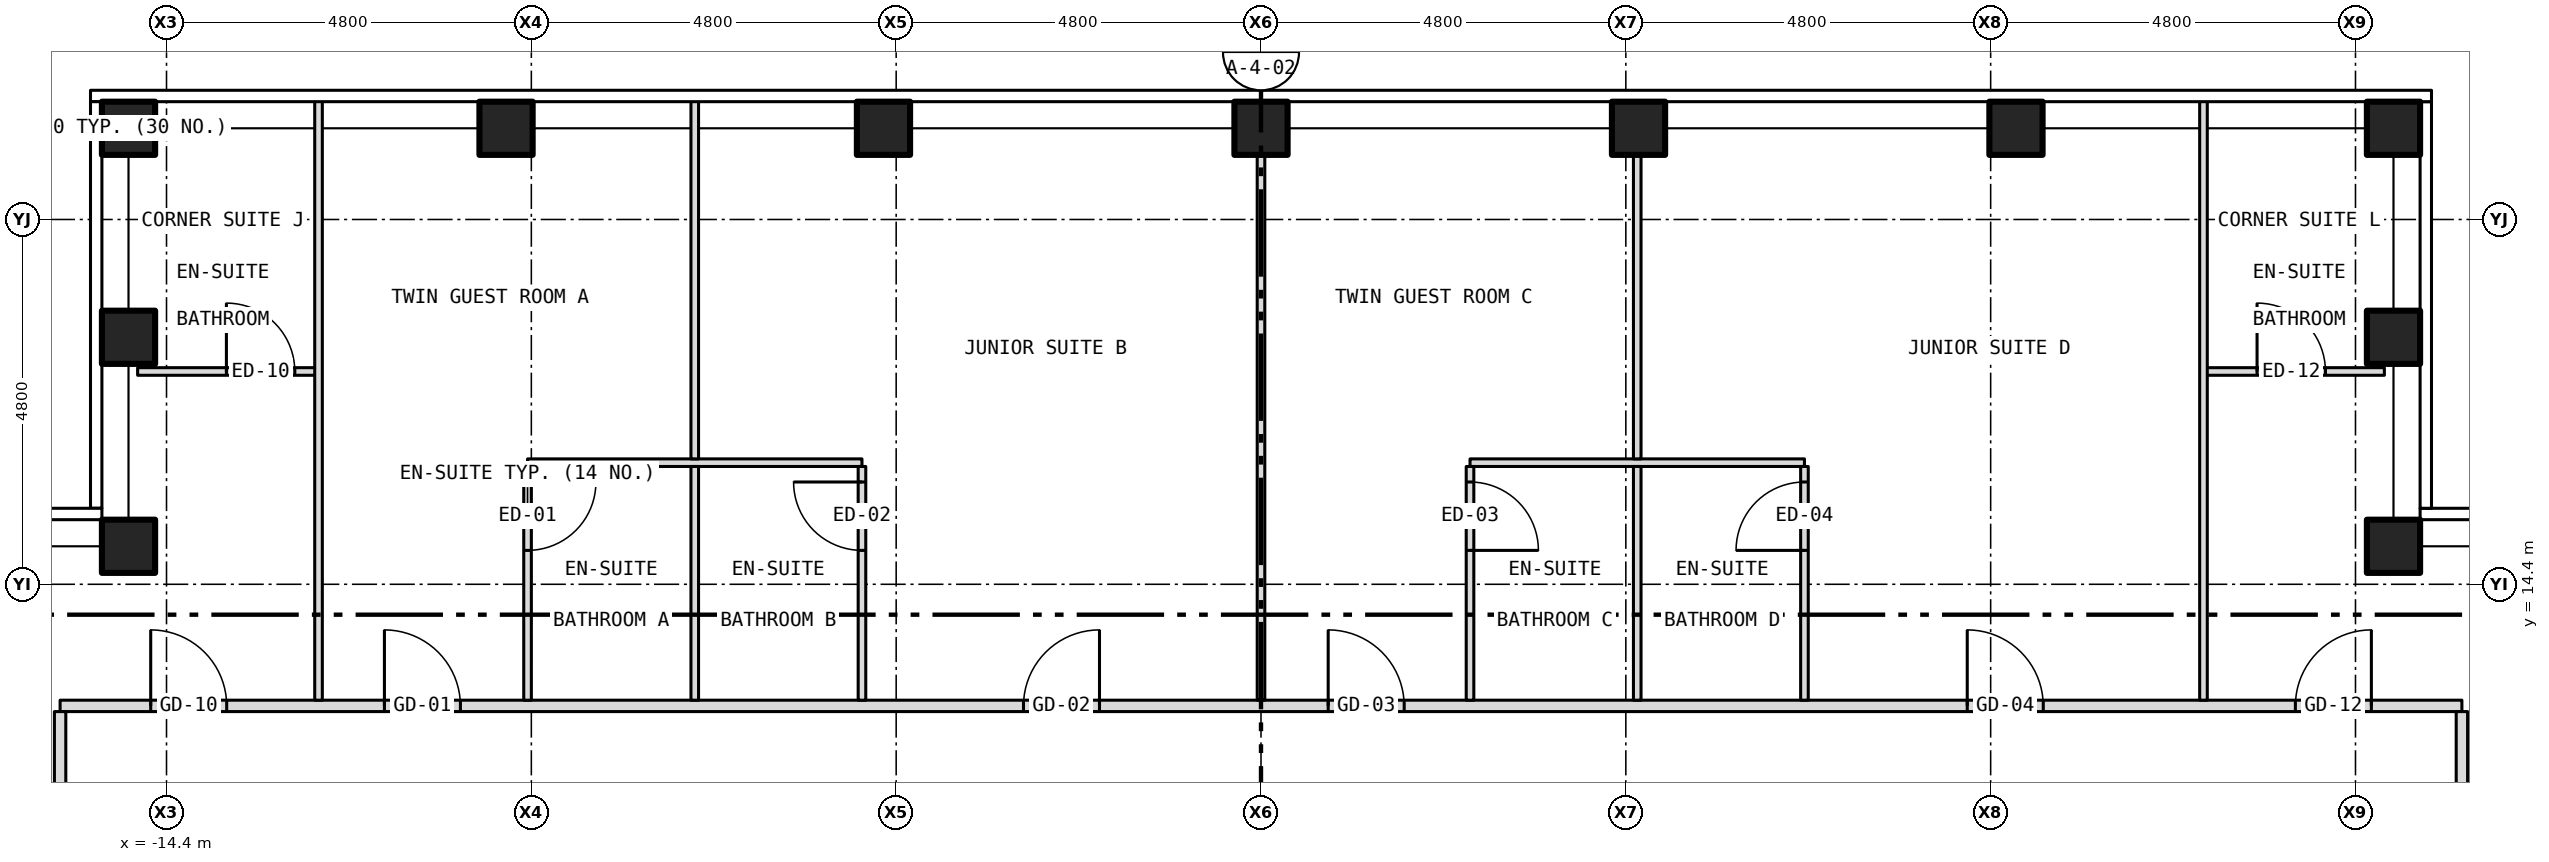
"""IFC4 building model, lengths in metres.
Left out: names, types, materials, properties, quantities, classifications, styles, units other than length and angle.
Written with IfcOpenShell. Run it as: python <this file> out.ifc"""

import sys

from ifc_helpers import new_model, si_unit, direction, frame, frame_2d, origin, origin_2d, place, context, subcontext, project, spatial, rectangle, hollow_rectangle, extrude, element, fill, save


model = new_model("IFC4")
c1 = context("Model", 3, precision=1e-05, world=origin(), true_north=direction((0.0, 1.0)))
c2 = subcontext(c1, "Body", "Model", "MODEL_VIEW")
j1 = project(units=[si_unit("LENGTHUNIT", "METRE"), si_unit("PLANEANGLEUNIT", "RADIAN")], contexts=[c1])
p1 = place(None, origin())
s1 = spatial("IfcSite", under=j1, at=p1, CompositionType="ELEMENT")
p2 = place(p1, origin())
s2 = spatial("IfcBuilding", under=s1, at=p2, CompositionType="ELEMENT")
p3 = place(p2, frame((0.0, 0.0, 201.5)))
s3 = spatial("IfcBuildingStorey", under=s2, at=p3, CompositionType="ELEMENT", Elevation=201.5)
for number, where, z_axis, x_axis in (
    (1, (-14.9, 20.4, -0.15), (0.0, 0.0, 1.0), (1.0, 0.0, 0.0)),
    (2, (-9.933, 20.4, -0.15), (0.0, 0.0, 1.0), (1.0, 0.0, 0.0)),
    (3, (-4.967, 20.4, -0.15), (0.0, 0.0, 1.0), (1.0, 0.0, 0.0)),
    (4, (0.0, 20.4, -0.15), (0.0, 0.0, 1.0), (1.0, 0.0, 0.0)),
    (5, (4.967, 20.4, -0.15), (0.0, 0.0, 1.0), (1.0, 0.0, 0.0)),
    (6, (9.933, 20.4, -0.15), (0.0, 0.0, 1.0), (1.0, 0.0, 0.0)),
    (7, (14.9, 20.4, -0.15), (0.0, 0.0, 1.0), (1.0, 0.0, 0.0)),
    (8, (-14.9, 14.9, -0.15), (0.0, 0.0, 1.0), (1.0, 0.0, 0.0)),
    (9, (-14.9, 17.65, -0.15), (0.0, 0.0, 1.0), (1.0, 0.0, 0.0)),
    (10, (14.9, 14.9, -0.15), (0.0, 0.0, 1.0), (1.0, 0.0, 0.0)),
    (11, (14.9, 17.65, -0.15), (0.0, 0.0, 1.0), (1.0, 0.0, 0.0)),
):
    element("IfcColumn", number, at=place(p3, frame(where, z_axis=z_axis, x_axis=x_axis)), inside=s3, PredefinedType="COLUMN", context=c2, shape_type="SweptSolid", body=[
        extrude(hollow_rectangle(XDim=0.7, YDim=0.7, WallThickness=0.04, at=origin_2d()), origin(), (0.0, 0.0, 1.0), 3.5),
    ])
p4 = place(p3, frame((-15.8, 12.8, 0.0), z_axis=(0.0, 0.0, 1.0), x_axis=(1.0, 0.0, 0.0)))
e12 = element("IfcWall", 12, at=p4, inside=s3, PredefinedType="PARTITIONING", context=c2, shape_type="SweptSolid", body=[
    extrude(rectangle(XDim=31.6, YDim=0.15, at=frame_2d((15.8, 0.0))), origin(), (0.0, 0.0, 1.0), 3.35),
])
p5 = place(p4, frame((4.267, 0.0, 0.0)))
e13 = element("IfcOpeningElement", 13, at=p5, cuts=e12, PredefinedType="OPENING", context=c2, shape_type="SweptSolid", body=[
    extrude(rectangle(XDim=1.0, YDim=2.1, at=frame_2d((0.5, 1.05))), frame((0.0, 0.087, 0.0), z_axis=(0.0, -1.0, 0.0), x_axis=(1.0, 0.0, 0.0)), (0.0, 0.0, 1.0), 0.174),
])
p6 = place(p4, frame((12.675, 0.0, 0.0)))
e14 = element("IfcOpeningElement", 14, at=p6, cuts=e12, PredefinedType="OPENING", context=c2, shape_type="SweptSolid", body=[
    extrude(rectangle(XDim=1.0, YDim=2.1, at=frame_2d((0.5, 1.05))), frame((0.0, 0.087, 0.0), z_axis=(0.0, -1.0, 0.0), x_axis=(1.0, 0.0, 0.0)), (0.0, 0.0, 1.0), 0.174),
])
p7 = place(p4, frame((16.684, 0.0, 0.0)))
e15 = element("IfcOpeningElement", 15, at=p7, cuts=e12, PredefinedType="OPENING", context=c2, shape_type="SweptSolid", body=[
    extrude(rectangle(XDim=1.0, YDim=2.1, at=frame_2d((0.5, 1.05))), frame((0.0, 0.087, 0.0), z_axis=(0.0, -1.0, 0.0), x_axis=(1.0, 0.0, 0.0)), (0.0, 0.0, 1.0), 0.174),
])
p8 = place(p4, frame((25.092, 0.0, 0.0)))
e16 = element("IfcOpeningElement", 16, at=p8, cuts=e12, PredefinedType="OPENING", context=c2, shape_type="SweptSolid", body=[
    extrude(rectangle(XDim=1.0, YDim=2.1, at=frame_2d((0.5, 1.05))), frame((0.0, 0.087, 0.0), z_axis=(0.0, -1.0, 0.0), x_axis=(1.0, 0.0, 0.0)), (0.0, 0.0, 1.0), 0.174),
])
p9 = place(p4, frame((1.192, 0.0, 0.0)))
e17 = element("IfcOpeningElement", 17, at=p9, cuts=e12, PredefinedType="OPENING", context=c2, shape_type="SweptSolid", body=[
    extrude(rectangle(XDim=1.0, YDim=2.1, at=frame_2d((0.5, 1.05))), frame((0.0, 0.087, 0.0), z_axis=(0.0, -1.0, 0.0), x_axis=(1.0, 0.0, 0.0)), (0.0, 0.0, 1.0), 0.174),
])
p10 = place(p4, frame((29.409, 0.0, 0.0)))
e18 = element("IfcOpeningElement", 18, at=p10, cuts=e12, PredefinedType="OPENING", context=c2, shape_type="SweptSolid", body=[
    extrude(rectangle(XDim=1.0, YDim=2.1, at=frame_2d((0.5, 1.05))), frame((0.0, 0.087, 0.0), z_axis=(0.0, -1.0, 0.0), x_axis=(1.0, 0.0, 0.0)), (0.0, 0.0, 1.0), 0.174),
])
for number, where, z_axis, x_axis in (
    (19, (-9.65, 16.0, 0.0), (0.0, 0.0, 1.0), (1.0, 0.0, 0.0)),
    (20, (2.75, 16.0, 0.0), (0.0, 0.0, 1.0), (1.0, 0.0, 0.0)),
):
    element("IfcWall", number, at=place(p3, frame(where, z_axis=z_axis, x_axis=x_axis)), inside=s3, PredefinedType="PARTITIONING", context=c2, shape_type="SweptSolid", body=[
        extrude(rectangle(XDim=4.4, YDim=0.1, at=frame_2d((2.2, 0.0))), origin(), (0.0, 0.0, 1.0), 3.35),
    ])
p11 = place(p3, frame((-14.78, 17.2, 0.0), z_axis=(0.0, 0.0, 1.0), x_axis=(1.0, 0.0, 0.0)))
e21 = element("IfcWall", 21, at=p11, inside=s3, PredefinedType="PARTITIONING", context=c2, shape_type="SweptSolid", body=[
    extrude(rectangle(XDim=2.38, YDim=0.1, at=frame_2d((1.19, 0.0))), origin(), (0.0, 0.0, 1.0), 3.35),
])
p12 = place(p11, frame((1.168, 0.0, 0.0)))
e22 = element("IfcOpeningElement", 22, at=p12, cuts=e21, PredefinedType="OPENING", context=c2, shape_type="SweptSolid", body=[
    extrude(rectangle(XDim=0.9, YDim=2.1, at=frame_2d((0.45, 1.05))), frame((0.0, 0.062, 0.0), z_axis=(0.0, -1.0, 0.0), x_axis=(1.0, 0.0, 0.0)), (0.0, 0.0, 1.0), 0.124),
])
p13 = place(p3, frame((12.4, 17.2, 0.0), z_axis=(0.0, 0.0, 1.0), x_axis=(1.0, 0.0, 0.0)))
e23 = element("IfcWall", 23, at=p13, inside=s3, PredefinedType="PARTITIONING", context=c2, shape_type="SweptSolid", body=[
    extrude(rectangle(XDim=2.38, YDim=0.1, at=frame_2d((1.19, 0.0))), origin(), (0.0, 0.0, 1.0), 3.35),
])
p14 = place(p13, frame((0.705, 0.0, 0.0)))
e24 = element("IfcOpeningElement", 24, at=p14, cuts=e23, PredefinedType="OPENING", context=c2, shape_type="SweptSolid", body=[
    extrude(rectangle(XDim=0.9, YDim=2.1, at=frame_2d((0.45, 1.05))), frame((0.0, 0.062, 0.0), z_axis=(0.0, -1.0, 0.0), x_axis=(1.0, 0.0, 0.0)), (0.0, 0.0, 1.0), 0.124),
])
p15 = place(p3, frame((-15.8, 10.92, 0.0), z_axis=(0.0, 0.0, 1.0), x_axis=(0.0, 1.0, 0.0)))
e25 = element("IfcWall", 25, at=p15, inside=s3, PredefinedType="PARTITIONING", context=c2, shape_type="SweptSolid", body=[
    extrude(rectangle(XDim=1.805, YDim=0.15, at=frame_2d((0.903, 0.0))), origin(), (0.0, 0.0, 1.0), 3.35),
])
p16 = place(p3, frame((-12.4, 12.875, 0.0), z_axis=(0.0, 0.0, 1.0), x_axis=(0.0, 1.0, 0.0)))
e26 = element("IfcWall", 26, at=p16, inside=s3, PredefinedType="PARTITIONING", context=c2, shape_type="SweptSolid", body=[
    extrude(rectangle(XDim=7.905, YDim=0.1, at=frame_2d((3.953, 0.0))), origin(), (0.0, 0.0, 1.0), 3.35),
])
p17 = place(p3, frame((-9.65, 12.875, 0.0), z_axis=(0.0, 0.0, 1.0), x_axis=(0.0, 1.0, 0.0)))
e27 = element("IfcWall", 27, at=p17, inside=s3, PredefinedType="PARTITIONING", context=c2, shape_type="SweptSolid", body=[
    extrude(rectangle(XDim=3.075, YDim=0.1, at=frame_2d((1.538, 0.0))), origin(), (0.0, 0.0, 1.0), 2.728),
])
p18 = place(p17, frame((1.971, 0.0, 0.0)))
e28 = element("IfcOpeningElement", 28, at=p18, cuts=e27, PredefinedType="OPENING", context=c2, shape_type="SweptSolid", body=[
    extrude(rectangle(XDim=0.9, YDim=2.1, at=frame_2d((0.45, 1.05))), frame((0.0, 0.062, 0.0), z_axis=(0.0, -1.0, 0.0), x_axis=(1.0, 0.0, 0.0)), (0.0, 0.0, 1.0), 0.124),
])
p19 = place(p3, frame((-7.45, 12.875, 0.0), z_axis=(0.0, 0.0, 1.0), x_axis=(0.0, 1.0, 0.0)))
e29 = element("IfcWall", 29, at=p19, inside=s3, PredefinedType="PARTITIONING", context=c2, shape_type="SweptSolid", body=[
    extrude(rectangle(XDim=3.075, YDim=0.1, at=frame_2d((1.538, 0.0))), origin(), (0.0, 0.0, 1.0), 3.35),
])
p20 = place(p3, frame((-7.45, 16.05, 0.0), z_axis=(0.0, 0.0, 1.0), x_axis=(0.0, 1.0, 0.0)))
e30 = element("IfcWall", 30, at=p20, inside=s3, PredefinedType="PARTITIONING", context=c2, shape_type="SweptSolid", body=[
    extrude(rectangle(XDim=4.73, YDim=0.1, at=frame_2d((2.365, 0.0))), origin(), (0.0, 0.0, 1.0), 3.35),
])
p21 = place(p3, frame((-5.25, 12.875, 0.0), z_axis=(0.0, 0.0, 1.0), x_axis=(0.0, 1.0, 0.0)))
e31 = element("IfcWall", 31, at=p21, inside=s3, PredefinedType="PARTITIONING", context=c2, shape_type="SweptSolid", body=[
    extrude(rectangle(XDim=3.075, YDim=0.1, at=frame_2d((1.538, 0.0))), origin(), (0.0, 0.0, 1.0), 3.35),
])
p22 = place(p21, frame((1.971, 0.0, 0.0)))
e32 = element("IfcOpeningElement", 32, at=p22, cuts=e31, PredefinedType="OPENING", context=c2, shape_type="SweptSolid", body=[
    extrude(rectangle(XDim=0.9, YDim=2.1, at=frame_2d((0.45, 1.05))), frame((0.0, 0.062, 0.0), z_axis=(0.0, -1.0, 0.0), x_axis=(1.0, 0.0, 0.0)), (0.0, 0.0, 1.0), 0.124),
])
p23 = place(p3, frame((0.0, 12.875, 0.0), z_axis=(0.0, 0.0, 1.0), x_axis=(0.0, 1.0, 0.0)))
e33 = element("IfcWall", 33, at=p23, inside=s3, PredefinedType="PARTITIONING", context=c2, shape_type="SweptSolid", body=[
    extrude(rectangle(XDim=7.405, YDim=0.1, at=frame_2d((3.703, 0.0))), origin(), (0.0, 0.0, 1.0), 2.728),
])
p24 = place(p3, frame((2.75, 12.875, 0.0), z_axis=(0.0, 0.0, 1.0), x_axis=(0.0, 1.0, 0.0)))
e34 = element("IfcWall", 34, at=p24, inside=s3, PredefinedType="PARTITIONING", context=c2, shape_type="SweptSolid", body=[
    extrude(rectangle(XDim=3.075, YDim=0.1, at=frame_2d((1.538, 0.0))), origin(), (0.0, 0.0, 1.0), 3.35),
])
p25 = place(p24, frame((1.971, 0.0, 0.0)))
e35 = element("IfcOpeningElement", 35, at=p25, cuts=e34, PredefinedType="OPENING", context=c2, shape_type="SweptSolid", body=[
    extrude(rectangle(XDim=0.9, YDim=2.1, at=frame_2d((0.45, 1.05))), frame((0.0, 0.062, 0.0), z_axis=(0.0, -1.0, 0.0), x_axis=(1.0, 0.0, 0.0)), (0.0, 0.0, 1.0), 0.124),
])
p26 = place(p3, frame((4.95, 12.875, 0.0), z_axis=(0.0, 0.0, 1.0), x_axis=(0.0, 1.0, 0.0)))
e36 = element("IfcWall", 36, at=p26, inside=s3, PredefinedType="PARTITIONING", context=c2, shape_type="SweptSolid", body=[
    extrude(rectangle(XDim=3.075, YDim=0.1, at=frame_2d((1.538, 0.0))), origin(), (0.0, 0.0, 1.0), 2.817),
])
p27 = place(p3, frame((4.95, 16.05, 0.0), z_axis=(0.0, 0.0, 1.0), x_axis=(0.0, 1.0, 0.0)))
e37 = element("IfcWall", 37, at=p27, inside=s3, PredefinedType="PARTITIONING", context=c2, shape_type="SweptSolid", body=[
    extrude(rectangle(XDim=4.23, YDim=0.1, at=frame_2d((2.115, 0.0))), origin(), (0.0, 0.0, 1.0), 2.817),
])
p28 = place(p3, frame((7.15, 12.875, 0.0), z_axis=(0.0, 0.0, 1.0), x_axis=(0.0, 1.0, 0.0)))
e38 = element("IfcWall", 38, at=p28, inside=s3, PredefinedType="PARTITIONING", context=c2, shape_type="SweptSolid", body=[
    extrude(rectangle(XDim=3.075, YDim=0.1, at=frame_2d((1.538, 0.0))), origin(), (0.0, 0.0, 1.0), 3.35),
])
p29 = place(p28, frame((1.971, 0.0, 0.0)))
e39 = element("IfcOpeningElement", 39, at=p29, cuts=e38, PredefinedType="OPENING", context=c2, shape_type="SweptSolid", body=[
    extrude(rectangle(XDim=0.9, YDim=2.1, at=frame_2d((0.45, 1.05))), frame((0.0, 0.062, 0.0), z_axis=(0.0, -1.0, 0.0), x_axis=(1.0, 0.0, 0.0)), (0.0, 0.0, 1.0), 0.124),
])
p30 = place(p3, frame((12.4, 12.875, 0.0), z_axis=(0.0, 0.0, 1.0), x_axis=(0.0, 1.0, 0.0)))
e40 = element("IfcWall", 40, at=p30, inside=s3, PredefinedType="PARTITIONING", context=c2, shape_type="SweptSolid", body=[
    extrude(rectangle(XDim=7.905, YDim=0.1, at=frame_2d((3.953, 0.0))), origin(), (0.0, 0.0, 1.0), 3.35),
])
p31 = place(p3, frame((15.8, 10.92, 0.0), z_axis=(0.0, 0.0, 1.0), x_axis=(0.0, 1.0, 0.0)))
e41 = element("IfcWall", 41, at=p31, inside=s3, PredefinedType="PARTITIONING", context=c2, shape_type="SweptSolid", body=[
    extrude(rectangle(XDim=1.805, YDim=0.15, at=frame_2d((0.903, 0.0))), origin(), (0.0, 0.0, 1.0), 3.35),
])
p32 = place(p5, origin())
e42 = element("IfcDoor", 42, at=p32, inside=s3, OperationType="SINGLE_SWING_LEFT", PredefinedType="DOOR", context=c2, shape_type="SweptSolid", body=[
    extrude(rectangle(XDim=1.0, YDim=2.1, at=frame_2d((0.5, 1.05))), frame((0.0, 0.025, 0.0), z_axis=(0.0, -1.0, 0.0), x_axis=(1.0, 0.0, 0.0)), (0.0, 0.0, 1.0), 0.05),
])
fill(e13, e42)
p33 = place(p18, origin())
e43 = element("IfcDoor", 43, at=p33, inside=s3, OperationType="SINGLE_SWING_RIGHT", PredefinedType="DOOR", context=c2, shape_type="SweptSolid", body=[
    extrude(rectangle(XDim=0.9, YDim=2.1, at=frame_2d((0.45, 1.05))), frame((0.0, 0.025, 0.0), z_axis=(0.0, -1.0, 0.0), x_axis=(1.0, 0.0, 0.0)), (0.0, 0.0, 1.0), 0.05),
])
fill(e28, e43)
p34 = place(p6, origin())
e44 = element("IfcDoor", 44, at=p34, inside=s3, OperationType="SINGLE_SWING_RIGHT", PredefinedType="DOOR", context=c2, shape_type="SweptSolid", body=[
    extrude(rectangle(XDim=1.0, YDim=2.1, at=frame_2d((0.5, 1.05))), frame((0.0, 0.025, 0.0), z_axis=(0.0, -1.0, 0.0), x_axis=(1.0, 0.0, 0.0)), (0.0, 0.0, 1.0), 0.05),
])
fill(e14, e44)
p35 = place(p22, origin())
e45 = element("IfcDoor", 45, at=p35, inside=s3, OperationType="SINGLE_SWING_RIGHT", PredefinedType="DOOR", context=c2, shape_type="SweptSolid", body=[
    extrude(rectangle(XDim=0.9, YDim=2.1, at=frame_2d((0.45, 1.05))), frame((0.0, 0.025, 0.0), z_axis=(0.0, -1.0, 0.0), x_axis=(1.0, 0.0, 0.0)), (0.0, 0.0, 1.0), 0.05),
])
fill(e32, e45)
p36 = place(p7, origin())
e46 = element("IfcDoor", 46, at=p36, inside=s3, OperationType="SINGLE_SWING_LEFT", PredefinedType="DOOR", context=c2, shape_type="SweptSolid", body=[
    extrude(rectangle(XDim=1.0, YDim=2.1, at=frame_2d((0.5, 1.05))), frame((0.0, 0.025, 0.0), z_axis=(0.0, -1.0, 0.0), x_axis=(1.0, 0.0, 0.0)), (0.0, 0.0, 1.0), 0.05),
])
fill(e15, e46)
p37 = place(p25, origin())
e47 = element("IfcDoor", 47, at=p37, inside=s3, OperationType="SINGLE_SWING_LEFT", PredefinedType="DOOR", context=c2, shape_type="SweptSolid", body=[
    extrude(rectangle(XDim=0.9, YDim=2.1, at=frame_2d((0.45, 1.05))), frame((0.0, 0.025, 0.0), z_axis=(0.0, -1.0, 0.0), x_axis=(1.0, 0.0, 0.0)), (0.0, 0.0, 1.0), 0.05),
])
fill(e35, e47)
p38 = place(p8, origin())
e48 = element("IfcDoor", 48, at=p38, inside=s3, OperationType="SINGLE_SWING_LEFT", PredefinedType="DOOR", context=c2, shape_type="SweptSolid", body=[
    extrude(rectangle(XDim=1.0, YDim=2.1, at=frame_2d((0.5, 1.05))), frame((0.0, 0.025, 0.0), z_axis=(0.0, -1.0, 0.0), x_axis=(1.0, 0.0, 0.0)), (0.0, 0.0, 1.0), 0.05),
])
fill(e16, e48)
p39 = place(p29, origin())
e49 = element("IfcDoor", 49, at=p39, inside=s3, OperationType="SINGLE_SWING_LEFT", PredefinedType="DOOR", context=c2, shape_type="SweptSolid", body=[
    extrude(rectangle(XDim=0.9, YDim=2.1, at=frame_2d((0.45, 1.05))), frame((0.0, 0.025, 0.0), z_axis=(0.0, -1.0, 0.0), x_axis=(1.0, 0.0, 0.0)), (0.0, 0.0, 1.0), 0.05),
])
fill(e39, e49)
p40 = place(p12, origin())
e50 = element("IfcDoor", 50, at=p40, inside=s3, OperationType="SINGLE_SWING_LEFT", PredefinedType="DOOR", context=c2, shape_type="SweptSolid", body=[
    extrude(rectangle(XDim=0.9, YDim=2.1, at=frame_2d((0.45, 1.05))), frame((0.0, 0.025, 0.0), z_axis=(0.0, -1.0, 0.0), x_axis=(1.0, 0.0, 0.0)), (0.0, 0.0, 1.0), 0.05),
])
fill(e22, e50)
p41 = place(p9, origin())
e51 = element("IfcDoor", 51, at=p41, inside=s3, OperationType="SINGLE_SWING_LEFT", PredefinedType="DOOR", context=c2, shape_type="SweptSolid", body=[
    extrude(rectangle(XDim=1.0, YDim=2.1, at=frame_2d((0.5, 1.05))), frame((0.0, 0.025, 0.0), z_axis=(0.0, -1.0, 0.0), x_axis=(1.0, 0.0, 0.0)), (0.0, 0.0, 1.0), 0.05),
])
fill(e17, e51)
p42 = place(p14, origin())
e52 = element("IfcDoor", 52, at=p42, inside=s3, OperationType="SINGLE_SWING_LEFT", PredefinedType="DOOR", context=c2, shape_type="SweptSolid", body=[
    extrude(rectangle(XDim=0.9, YDim=2.1, at=frame_2d((0.45, 1.05))), frame((0.0, 0.025, 0.0), z_axis=(0.0, -1.0, 0.0), x_axis=(1.0, 0.0, 0.0)), (0.0, 0.0, 1.0), 0.05),
])
fill(e24, e52)
p43 = place(p10, origin())
e53 = element("IfcDoor", 53, at=p43, inside=s3, OperationType="SINGLE_SWING_RIGHT", PredefinedType="DOOR", context=c2, shape_type="SweptSolid", body=[
    extrude(rectangle(XDim=1.0, YDim=2.1, at=frame_2d((0.5, 1.05))), frame((0.0, 0.025, 0.0), z_axis=(0.0, -1.0, 0.0), x_axis=(1.0, 0.0, 0.0)), (0.0, 0.0, 1.0), 0.05),
])
fill(e18, e53)
save(model, sys.argv[1])
